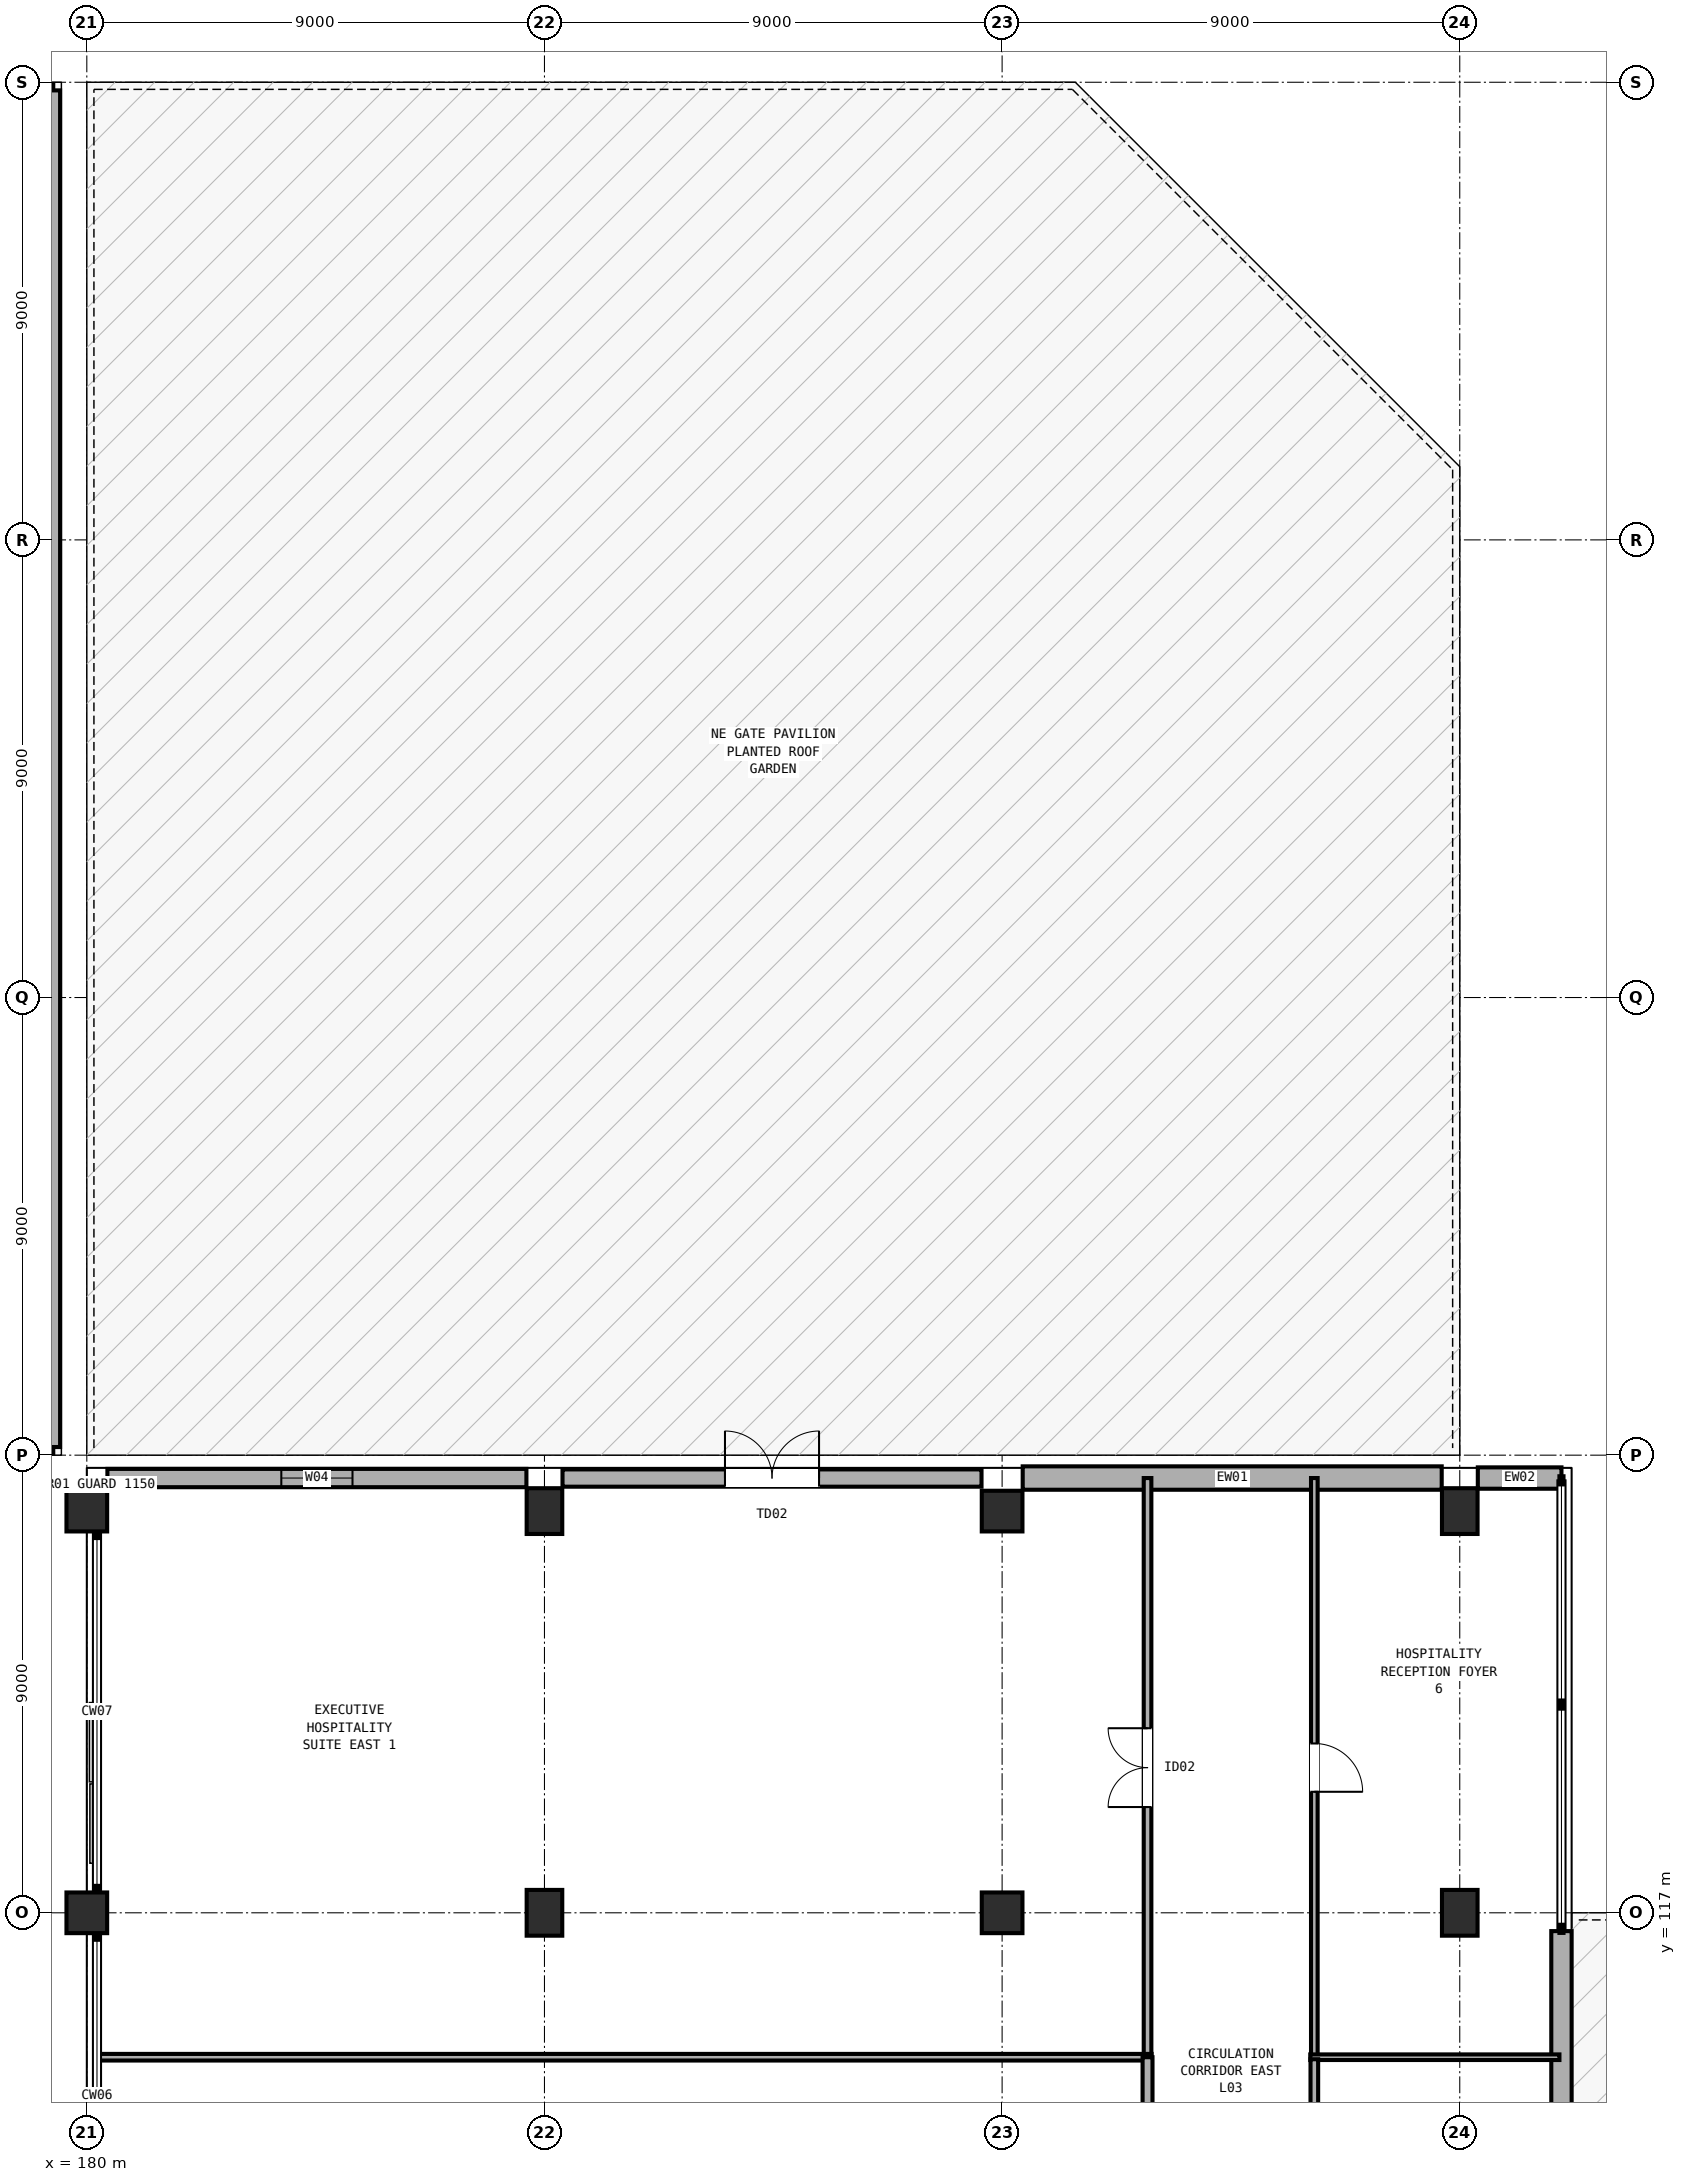
"""IFC4 building model, lengths in metres.
Left out: names, types, materials, properties, quantities, classifications, styles, units other than length and angle.
Written with IfcOpenShell. Run it as: python <this file> out.ifc"""

import sys

from ifc_helpers import new_model, si_unit, direction, frame, frame_2d, origin, origin_2d, place, context, subcontext, project, spatial, rectangle, extrude, element, fill, save


model = new_model("IFC4")
c1 = context("Model", 3, precision=1e-05, world=origin(), true_north=direction((0.0, 1.0)))
c2 = subcontext(c1, "Body", "Model", "MODEL_VIEW")
j1 = project(units=[si_unit("LENGTHUNIT", "METRE"), si_unit("PLANEANGLEUNIT", "RADIAN")], contexts=[c1])
p1 = place(None, origin())
s1 = spatial("IfcSite", under=j1, at=p1, CompositionType="ELEMENT")
p2 = place(p1, origin())
s2 = spatial("IfcBuilding", under=s1, at=p2, CompositionType="ELEMENT")
p3 = place(p2, frame((0.0, 0.0, 14.4)))
s3 = spatial("IfcBuildingStorey", under=s2, at=p3, CompositionType="ELEMENT", Elevation=14.4)
for number, where, z_axis, x_axis in (
    (1, (180.0, 117.0, 0.0), (0.0, 0.0, 1.0), (1.0, 0.0, 0.0)),
    (2, (180.0, 124.9, 0.0), (0.0, 0.0, 1.0), (1.0, 0.0, 0.0)),
):
    element("IfcColumn", number, at=place(p3, frame(where, z_axis=z_axis, x_axis=x_axis)), inside=s3, PredefinedType="COLUMN", context=c2, shape_type="SweptSolid", body=[
        extrude(rectangle(XDim=0.8, YDim=0.8, at=origin_2d()), origin(), (0.0, 0.0, 1.0), 4.8),
    ])
for number, where, z_axis, x_axis in (
    (3, (189.0, 117.0, 0.0), (0.0, 0.0, 1.0), (1.0, 0.0, 0.0)),
    (4, (189.0, 124.9, 0.0), (0.0, 0.0, 1.0), (1.0, 0.0, 0.0)),
):
    element("IfcColumn", number, at=place(p3, frame(where, z_axis=z_axis, x_axis=x_axis)), inside=s3, PredefinedType="COLUMN", context=c2, shape_type="SweptSolid", body=[
        extrude(rectangle(XDim=0.7, YDim=0.9, at=origin_2d()), origin(), (0.0, 0.0, 1.0), 4.8),
    ])
for number, where, z_axis, x_axis in (
    (5, (198.0, 117.0, 0.0), (0.0, 0.0, 1.0), (1.0, 0.0, 0.0)),
    (6, (198.0, 124.9, 0.0), (0.0, 0.0, 1.0), (1.0, 0.0, 0.0)),
):
    element("IfcColumn", number, at=place(p3, frame(where, z_axis=z_axis, x_axis=x_axis)), inside=s3, PredefinedType="COLUMN", context=c2, shape_type="SweptSolid", body=[
        extrude(rectangle(XDim=0.8, YDim=0.8, at=origin_2d()), origin(), (0.0, 0.0, 1.0), 4.8),
    ])
for number, where, z_axis, x_axis in (
    (7, (207.0, 117.0, 0.0), (0.0, 0.0, 1.0), (1.0, 0.0, 0.0)),
    (8, (207.0, 124.9, 0.0), (0.0, 0.0, 1.0), (1.0, 0.0, 0.0)),
):
    element("IfcColumn", number, at=place(p3, frame(where, z_axis=z_axis, x_axis=x_axis)), inside=s3, PredefinedType="COLUMN", context=c2, shape_type="SweptSolid", body=[
        extrude(rectangle(XDim=0.7, YDim=0.9, at=origin_2d()), origin(), (0.0, 0.0, 1.0), 4.8),
    ])
p4 = place(p3, frame((180.405, 125.55, 0.0), z_axis=(0.0, 0.0, 1.0), x_axis=(1.0, 0.0, 0.0)))
e9 = element("IfcWall", 9, at=p4, inside=s3, PredefinedType="SOLIDWALL", context=c2, shape_type="SweptSolid", body=[
    extrude(rectangle(XDim=8.24, YDim=0.36, at=frame_2d((4.12, 0.0))), origin(), (0.0, 0.0, 1.0), 3.58),
])
p5 = place(p4, frame((3.42, 0.0, 0.9)))
e10 = element("IfcOpeningElement", 10, at=p5, cuts=e9, PredefinedType="OPENING", context=c2, shape_type="SweptSolid", body=[
    extrude(rectangle(XDim=1.4, YDim=1.55, at=frame_2d((0.7, 0.775))), frame((0.0, 0.19, 0.0), z_axis=(0.0, -1.0, 0.0), x_axis=(1.0, 0.0, 0.0)), (0.0, 0.0, 1.0), 0.38),
])
p6 = place(p3, frame((189.355, 125.55, 0.0), z_axis=(0.0, 0.0, 1.0), x_axis=(1.0, 0.0, 0.0)))
e11 = element("IfcWall", 11, at=p6, inside=s3, PredefinedType="SOLIDWALL", context=c2, shape_type="SweptSolid", body=[
    extrude(rectangle(XDim=8.24, YDim=0.34, at=frame_2d((4.12, 0.0))), origin(), (0.0, 0.0, 1.0), 3.58),
])
p7 = place(p6, frame((3.195, 0.0, 0.0)))
e12 = element("IfcOpeningElement", 12, at=p7, cuts=e11, PredefinedType="OPENING", context=c2, shape_type="SweptSolid", body=[
    extrude(rectangle(XDim=1.85, YDim=2.25, at=frame_2d((0.925, 1.125))), frame((0.0, 0.18, 0.0), z_axis=(0.0, -1.0, 0.0), x_axis=(1.0, 0.0, 0.0)), (0.0, 0.0, 1.0), 0.36),
])
p8 = place(p3, frame((198.405, 125.55, 0.0), z_axis=(0.0, 0.0, 1.0), x_axis=(1.0, 0.0, 0.0)))
e13 = element("IfcWall", 13, at=p8, inside=s3, PredefinedType="SOLIDWALL", context=c2, shape_type="SweptSolid", body=[
    extrude(rectangle(XDim=8.24, YDim=0.46, at=frame_2d((4.12, 0.0))), origin(), (0.0, 0.0, 1.0), 3.58),
])
p9 = place(p3, frame((207.355, 125.55, 0.0), z_axis=(0.0, 0.0, 1.0), x_axis=(1.0, 0.0, 0.0)))
e14 = element("IfcWall", 14, at=p9, inside=s3, PredefinedType="SOLIDWALL", context=c2, shape_type="SweptSolid", body=[
    extrude(rectangle(XDim=1.645, YDim=0.42, at=frame_2d((0.823, 0.0))), origin(), (0.0, 0.0, 1.0), 3.58),
])
p10 = place(p3, frame((209.0, 116.64, 0.0), z_axis=(0.0, 0.0, 1.0), x_axis=(0.0, -1.0, 0.0)))
e15 = element("IfcWall", 15, at=p10, inside=s3, PredefinedType="SOLIDWALL", context=c2, shape_type="SweptSolid", body=[
    extrude(rectangle(XDim=8.91, YDim=0.4, at=frame_2d((4.455, 0.0))), origin(), (0.0, 0.0, 1.0), 3.58),
])
p11 = place(p10, frame((3.63, 0.0, 0.0)))
e16 = element("IfcOpeningElement", 16, at=p11, cuts=e15, PredefinedType="OPENING", context=c2, shape_type="SweptSolid", body=[
    extrude(rectangle(XDim=1.65, YDim=2.2, at=frame_2d((0.825, 1.1))), frame((0.0, 0.21, 0.0), z_axis=(0.0, -1.0, 0.0), x_axis=(1.0, 0.0, 0.0)), (0.0, 0.0, 1.0), 0.42),
])
for number, where, z_axis, x_axis in (
    (17, (179.34, 126.16, 0.0), (0.0, 0.0, 1.0), (-1.0, 0.0, 0.0)),
    (18, (162.16, 152.84, 0.0), (0.0, 0.0, 1.0), (1.0, 0.0, 0.0)),
):
    element("IfcWall", number, at=place(p3, frame(where, z_axis=z_axis, x_axis=x_axis)), inside=s3, PredefinedType="PARAPET", context=c2, shape_type="SweptSolid", body=[
        extrude(rectangle(XDim=17.18, YDim=0.25, at=frame_2d((8.59, 0.0))), origin(), (0.0, 0.0, 1.0), 0.65),
    ])
p12 = place(p3, frame((179.34, 152.84, 0.0), z_axis=(0.0, 0.0, 1.0), x_axis=(0.0, -1.0, 0.0)))
e19 = element("IfcWall", 19, at=p12, inside=s3, PredefinedType="PARAPET", context=c2, shape_type="SweptSolid", body=[
    extrude(rectangle(XDim=26.68, YDim=0.27, at=frame_2d((13.34, 0.0))), origin(), (0.0, 0.0, 1.0), 0.65),
])
p13 = place(p3, frame((200.86, 114.16, 0.0), z_axis=(0.0, 0.0, 1.0), x_axis=(0.0, 1.0, 0.0)))
e20 = element("IfcWall", 20, at=p13, inside=s3, PredefinedType="PARTITIONING", context=c2, shape_type="SweptSolid", body=[
    extrude(rectangle(XDim=11.39, YDim=0.15, at=frame_2d((5.695, 0.0))), origin(), (0.0, 0.0, 1.0), 3.56),
])
p14 = place(p13, frame((4.92, 0.0, 0.0)))
e21 = element("IfcOpeningElement", 21, at=p14, cuts=e20, PredefinedType="OPENING", context=c2, shape_type="SweptSolid", body=[
    extrude(rectangle(XDim=1.55, YDim=2.2, at=frame_2d((0.775, 1.1))), frame((0.0, 0.085, 0.0), z_axis=(0.0, -1.0, 0.0), x_axis=(1.0, 0.0, 0.0)), (0.0, 0.0, 1.0), 0.17),
])
p15 = place(p3, frame((200.94, 114.16, 0.0), z_axis=(0.0, 0.0, 1.0), x_axis=(-1.0, 0.0, 0.0)))
e22 = element("IfcWall", 22, at=p15, inside=s3, PredefinedType="PARTITIONING", context=c2, shape_type="SweptSolid", body=[
    extrude(rectangle(XDim=20.707, YDim=0.13, at=frame_2d((10.354, 0.0))), origin(), (0.0, 0.0, 1.0), 3.56),
])
p16 = place(p3, frame((200.86, 102.77, 0.0), z_axis=(0.0, 0.0, 1.0), x_axis=(0.0, 1.0, 0.0)))
e23 = element("IfcWall", 23, at=p16, inside=s3, PredefinedType="PARTITIONING", context=c2, shape_type="SweptSolid", body=[
    extrude(rectangle(XDim=11.39, YDim=0.195, at=frame_2d((5.695, 0.0))), origin(), (0.0, 0.0, 1.0), 3.56),
])
p17 = place(p16, frame((5.185, 0.0, 0.0)))
e24 = element("IfcOpeningElement", 24, at=p17, cuts=e23, PredefinedType="OPENING", context=c2, shape_type="SweptSolid", body=[
    extrude(rectangle(XDim=1.02, YDim=2.16, at=frame_2d((0.51, 1.08))), frame((0.0, 0.107, 0.0), z_axis=(0.0, -1.0, 0.0), x_axis=(1.0, 0.0, 0.0)), (0.0, 0.0, 1.0), 0.215),
])
p18 = place(p3, frame((204.14, 125.55, 0.0), z_axis=(0.0, 0.0, 1.0), x_axis=(0.0, -1.0, 0.0)))
e25 = element("IfcWall", 25, at=p18, inside=s3, PredefinedType="PARTITIONING", context=c2, shape_type="SweptSolid", body=[
    extrude(rectangle(XDim=11.39, YDim=0.13, at=frame_2d((5.695, 0.0))), origin(), (0.0, 0.0, 1.0), 3.56),
])
p19 = place(p18, frame((5.22, 0.0, 0.0)))
e26 = element("IfcOpeningElement", 26, at=p19, cuts=e25, PredefinedType="OPENING", context=c2, shape_type="SweptSolid", body=[
    extrude(rectangle(XDim=0.95, YDim=2.18, at=frame_2d((0.475, 1.09))), frame((0.0, 0.075, 0.0), z_axis=(0.0, -1.0, 0.0), x_axis=(1.0, 0.0, 0.0)), (0.0, 0.0, 1.0), 0.15),
])
p20 = place(p3, frame((208.96, 114.16, 0.0), z_axis=(0.0, 0.0, 1.0), x_axis=(-1.0, 0.0, 0.0)))
e27 = element("IfcWall", 27, at=p20, inside=s3, PredefinedType="PARTITIONING", context=c2, shape_type="SweptSolid", body=[
    extrude(rectangle(XDim=4.9, YDim=0.11, at=frame_2d((2.45, 0.0))), origin(), (0.0, 0.0, 1.0), 3.56),
])
p21 = place(p3, frame((204.14, 102.81, 0.0), z_axis=(0.0, 0.0, 1.0), x_axis=(0.0, 1.0, 0.0)))
e28 = element("IfcWall", 28, at=p21, inside=s3, PredefinedType="PARTITIONING", context=c2, shape_type="SweptSolid", body=[
    extrude(rectangle(XDim=11.31, YDim=0.15, at=frame_2d((5.655, 0.0))), origin(), (0.0, 0.0, 1.0), 3.56),
])
p22 = place(p5, origin())
e29 = element("IfcWindow", 29, at=p22, inside=s3, PartitioningType="SINGLE_PANEL", PredefinedType="WINDOW", context=c2, shape_type="SweptSolid", body=[
    extrude(rectangle(XDim=1.4, YDim=1.55, at=frame_2d((0.7, 0.775))), frame((0.0, 0.03, 0.0), z_axis=(0.0, -1.0, 0.0), x_axis=(1.0, 0.0, 0.0)), (0.0, 0.0, 1.0), 0.06),
])
fill(e10, e29)
p23 = place(p7, origin())
e30 = element("IfcDoor", 30, at=p23, inside=s3, OperationType="DOUBLE_DOOR_SINGLE_SWING", PredefinedType="DOOR", context=c2, shape_type="SweptSolid", body=[
    extrude(rectangle(XDim=1.85, YDim=2.25, at=frame_2d((0.925, 1.125))), frame((0.0, 0.025, 0.0), z_axis=(0.0, -1.0, 0.0), x_axis=(1.0, 0.0, 0.0)), (0.0, 0.0, 1.0), 0.05),
])
fill(e12, e30)
p24 = place(p14, origin())
e31 = element("IfcDoor", 31, at=p24, inside=s3, OperationType="DOUBLE_DOOR_SINGLE_SWING", PredefinedType="DOOR", context=c2, shape_type="SweptSolid", body=[
    extrude(rectangle(XDim=1.55, YDim=2.2, at=frame_2d((0.775, 1.1))), frame((0.0, 0.025, 0.0), z_axis=(0.0, -1.0, 0.0), x_axis=(1.0, 0.0, 0.0)), (0.0, 0.0, 1.0), 0.05),
])
fill(e21, e31)
p25 = place(p19, origin())
e32 = element("IfcDoor", 32, at=p25, inside=s3, OperationType="SINGLE_SWING_RIGHT", PredefinedType="DOOR", context=c2, shape_type="SweptSolid", body=[
    extrude(rectangle(XDim=0.95, YDim=2.18, at=frame_2d((0.475, 1.09))), frame((0.0, 0.025, 0.0), z_axis=(0.0, -1.0, 0.0), x_axis=(1.0, 0.0, 0.0)), (0.0, 0.0, 1.0), 0.05),
])
fill(e26, e32)
save(model, sys.argv[1])
